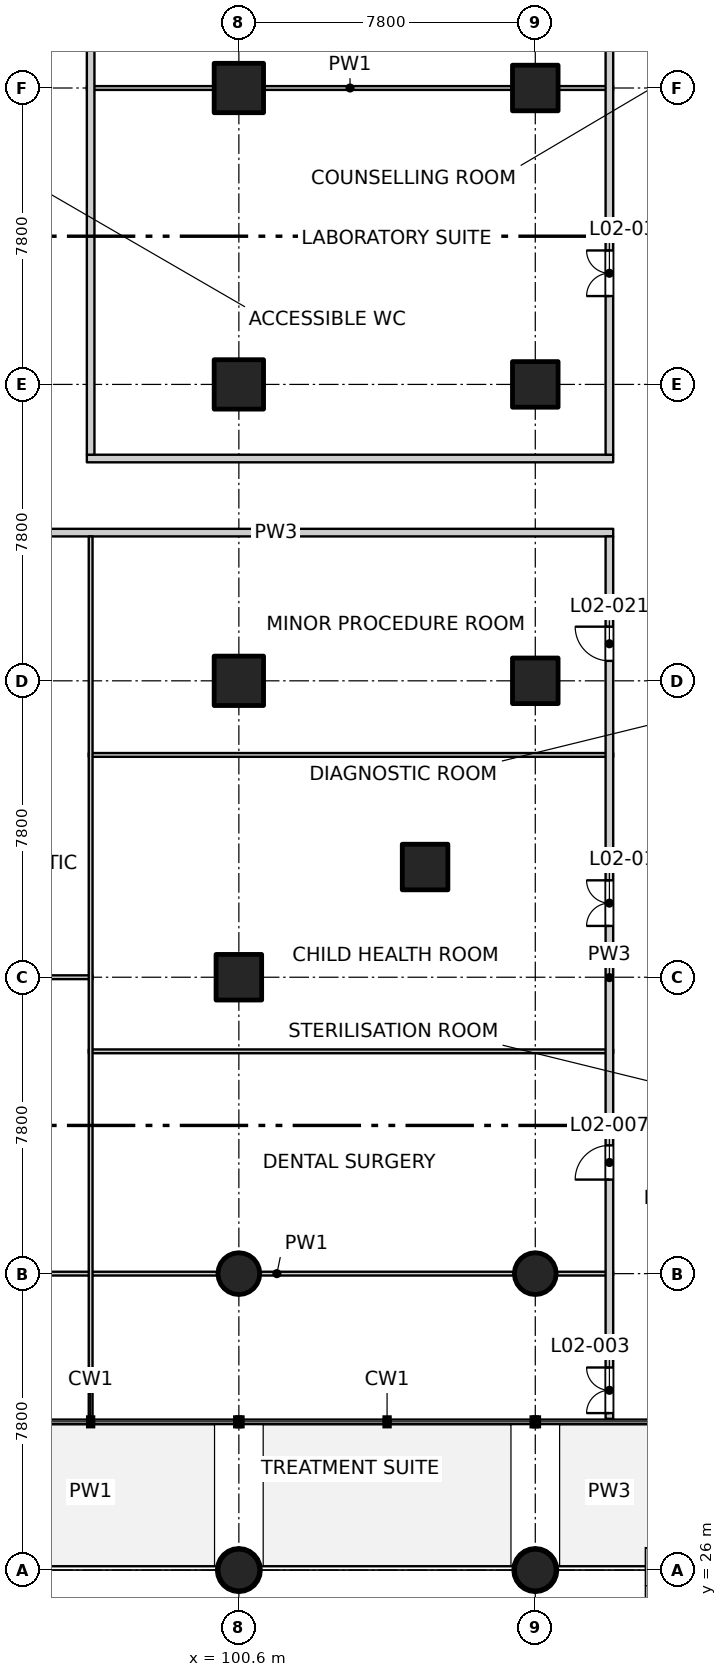
"""IFC4 building model, lengths in metres.
Left out: names, types, materials, properties, quantities, classifications, styles, units other than length and angle.
Written with IfcOpenShell. Run it as: python <this file> out.ifc"""

import sys

from ifc_helpers import new_model, si_unit, direction, frame, frame_2d, origin, origin_2d, place, context, subcontext, project, spatial, rectangle, circle, extrude, element, fill, save


model = new_model("IFC4")
c1 = context("Model", 3, precision=1e-05, world=origin(), true_north=direction((0.0, 1.0)))
c2 = subcontext(c1, "Body", "Model", "MODEL_VIEW")
j1 = project(units=[si_unit("LENGTHUNIT", "METRE"), si_unit("PLANEANGLEUNIT", "RADIAN")], contexts=[c1])
p1 = place(None, origin())
s1 = spatial("IfcSite", under=j1, at=p1, CompositionType="ELEMENT")
p2 = place(p1, origin())
s2 = spatial("IfcBuilding", under=s1, at=p2, CompositionType="ELEMENT")
p3 = place(p2, frame((0.0, 0.0, 10.5)))
s3 = spatial("IfcBuildingStorey", under=s2, at=p3, CompositionType="ELEMENT", Elevation=10.5)
for number, where, z_axis, x_axis in (
    (1, (105.5, 44.5, -0.3), (0.0, 0.0, 1.0), (1.0, 0.0, 0.0)),
    (2, (108.4, 49.4, -0.3), (0.0, 0.0, 1.0), (1.0, 0.0, 0.0)),
    (3, (108.4, 57.2, -0.3), (0.0, 0.0, 1.0), (1.0, 0.0, 0.0)),
    (4, (108.4, 65.0, -0.3), (0.0, 0.0, 1.0), (1.0, 0.0, 0.0)),
    (5, (100.6, 41.6, -0.3), (0.0, 0.0, 1.0), (1.0, 0.0, 0.0)),
):
    element("IfcColumn", number, at=place(p3, frame(where, z_axis=z_axis, x_axis=x_axis)), inside=s3, PredefinedType="COLUMN", context=c2, shape_type="SweptSolid", body=[
        extrude(rectangle(XDim=1.2, YDim=1.2, at=origin_2d()), origin(), (0.0, 0.0, 1.0), 4.45),
    ])
for number, where, z_axis, x_axis in (
    (6, (100.6, 49.4, -0.3), (0.0, 0.0, 1.0), (1.0, 0.0, 0.0)),
    (7, (100.6, 57.2, -0.3), (0.0, 0.0, 1.0), (1.0, 0.0, 0.0)),
    (8, (100.6, 65.0, -0.3), (0.0, 0.0, 1.0), (1.0, 0.0, 0.0)),
):
    element("IfcColumn", number, at=place(p3, frame(where, z_axis=z_axis, x_axis=x_axis)), inside=s3, PredefinedType="COLUMN", context=c2, shape_type="SweptSolid", body=[
        extrude(rectangle(XDim=1.3, YDim=1.3, at=origin_2d()), origin(), (0.0, 0.0, 1.0), 4.45),
    ])
for number, where, z_axis, x_axis in (
    (9, (100.6, 26.0, -0.3), (0.0, 0.0, 1.0), (1.0, 0.0, 0.0)),
    (10, (100.6, 33.8, -0.3), (0.0, 0.0, 1.0), (1.0, 0.0, 0.0)),
    (11, (108.4, 26.0, -0.3), (0.0, 0.0, 1.0), (1.0, 0.0, 0.0)),
    (12, (108.4, 33.8, -0.3), (0.0, 0.0, 1.0), (1.0, 0.0, 0.0)),
):
    element("IfcColumn", number, at=place(p3, frame(where, z_axis=z_axis, x_axis=x_axis)), inside=s3, PredefinedType="COLUMN", context=c2, shape_type="SweptSolid", body=[
        extrude(circle(Radius=0.55, at=origin_2d()), origin(), (0.0, 0.0, 1.0), 4.45),
    ])
p4 = place(p3, frame((92.75, 33.8, 0.0), z_axis=(0.0, 0.0, 1.0), x_axis=(1.0, 0.0, 0.0)))
e13 = element("IfcWall", 13, at=p4, inside=s3, PredefinedType="PARTITIONING", context=c2, shape_type="SweptSolid", body=[
    extrude(rectangle(XDim=17.7, YDim=0.1, at=frame_2d((8.85, 0.0))), origin(), (0.0, 0.0, 1.0), 4.15),
])
p5 = place(p3, frame((96.65, 39.65, 0.0), z_axis=(0.0, 0.0, 1.0), x_axis=(1.0, 0.0, 0.0)))
e14 = element("IfcWall", 14, at=p5, inside=s3, PredefinedType="PARTITIONING", context=c2, shape_type="SweptSolid", body=[
    extrude(rectangle(XDim=13.8, YDim=0.1, at=frame_2d((6.9, 0.0))), origin(), (0.0, 0.0, 1.0), 4.15),
])
p6 = place(p3, frame((92.75, 41.6, 0.0), z_axis=(0.0, 0.0, 1.0), x_axis=(1.0, 0.0, 0.0)))
e15 = element("IfcWall", 15, at=p6, inside=s3, PredefinedType="PARTITIONING", context=c2, shape_type="SweptSolid", body=[
    extrude(rectangle(XDim=4.0, YDim=0.1, at=frame_2d((2.0, 0.0))), origin(), (0.0, 0.0, 1.0), 3.7),
])
p7 = place(p3, frame((96.65, 47.45, 0.0), z_axis=(0.0, 0.0, 1.0), x_axis=(1.0, 0.0, 0.0)))
e16 = element("IfcWall", 16, at=p7, inside=s3, PredefinedType="PARTITIONING", context=c2, shape_type="SweptSolid", body=[
    extrude(rectangle(XDim=13.8, YDim=0.1, at=frame_2d((6.9, 0.0))), origin(), (0.0, 0.0, 1.0), 4.15),
])
p8 = place(p3, frame((92.7, 53.3, 0.0), z_axis=(0.0, 0.0, 1.0), x_axis=(1.0, 0.0, 0.0)))
e17 = element("IfcWall", 17, at=p8, inside=s3, PredefinedType="PARTITIONING", context=c2, shape_type="SweptSolid", body=[
    extrude(rectangle(XDim=17.75, YDim=0.2, at=frame_2d((8.875, 0.0))), origin(), (0.0, 0.0, 1.0), 4.15),
])
p9 = place(p3, frame((96.6, 55.25, 0.0), z_axis=(0.0, 0.0, 1.0), x_axis=(1.0, 0.0, 0.0)))
e18 = element("IfcWall", 18, at=p9, inside=s3, PredefinedType="PARTITIONING", context=c2, shape_type="SweptSolid", body=[
    extrude(rectangle(XDim=13.85, YDim=0.2, at=frame_2d((6.925, 0.0))), origin(), (0.0, 0.0, 1.0), 4.15),
])
p10 = place(p3, frame((96.6, 65.0, 0.0), z_axis=(0.0, 0.0, 1.0), x_axis=(1.0, 0.0, 0.0)))
e19 = element("IfcWall", 19, at=p10, inside=s3, PredefinedType="PARTITIONING", context=c2, shape_type="SweptSolid", body=[
    extrude(rectangle(XDim=13.85, YDim=0.1, at=frame_2d((6.925, 0.0))), origin(), (0.0, 0.0, 1.0), 4.15),
])
p11 = place(p3, frame((96.7, 26.3, 0.0), z_axis=(0.0, 0.0, 1.0), x_axis=(0.0, 1.0, 0.0)))
e20 = element("IfcWall", 20, at=p11, inside=s3, PredefinedType="PARTITIONING", context=c2, shape_type="SweptSolid", body=[
    extrude(rectangle(XDim=3.52, YDim=0.1, at=frame_2d((1.76, 0.0))), origin(), (0.0, 0.0, 1.0), 4.15),
])
p12 = place(p3, frame((96.7, 29.98, 0.0), z_axis=(0.0, 0.0, 1.0), x_axis=(0.0, 1.0, 0.0)))
e21 = element("IfcWall", 21, at=p12, inside=s3, PredefinedType="PARTITIONING", context=c2, shape_type="SweptSolid", body=[
    extrude(rectangle(XDim=23.22, YDim=0.1, at=frame_2d((11.61, 0.0))), origin(), (0.0, 0.0, 1.0), 4.15),
])
p13 = place(p3, frame((96.7, 55.35, 0.0), z_axis=(0.0, 0.0, 1.0), x_axis=(0.0, 1.0, 0.0)))
e22 = element("IfcWall", 22, at=p13, inside=s3, PredefinedType="PARTITIONING", context=c2, shape_type="SweptSolid", body=[
    extrude(rectangle(XDim=32.75, YDim=0.2, at=frame_2d((16.375, 0.0))), origin(), (0.0, 0.0, 1.0), 4.15),
])
p14 = place(p3, frame((110.35, 26.3, 0.0), z_axis=(0.0, 0.0, 1.0), x_axis=(0.0, 1.0, 0.0)))
e23 = element("IfcWall", 23, at=p14, inside=s3, PredefinedType="PARTITIONING", context=c2, shape_type="SweptSolid", body=[
    extrude(rectangle(XDim=3.52, YDim=0.2, at=frame_2d((1.76, 0.0))), origin(), (0.0, 0.0, 1.0), 4.15),
])
p15 = place(p3, frame((110.35, 29.98, 0.0), z_axis=(0.0, 0.0, 1.0), x_axis=(0.0, 1.0, 0.0)))
e24 = element("IfcWall", 24, at=p15, inside=s3, PredefinedType="PARTITIONING", context=c2, shape_type="SweptSolid", body=[
    extrude(rectangle(XDim=23.22, YDim=0.2, at=frame_2d((11.61, 0.0))), origin(), (0.0, 0.0, 1.0), 4.15),
])
p16 = place(p15, frame((0.15, 0.0, 0.0)))
e25 = element("IfcOpeningElement", 25, at=p16, cuts=e24, PredefinedType="OPENING", context=c2, shape_type="SweptSolid", body=[
    extrude(rectangle(XDim=1.2, YDim=2.1, at=frame_2d((0.6, 1.05))), frame((0.0, 0.11, 0.0), z_axis=(0.0, -1.0, 0.0), x_axis=(1.0, 0.0, 0.0)), (0.0, 0.0, 1.0), 0.22),
])
p17 = place(p15, frame((6.295, 0.0, 0.0)))
e26 = element("IfcOpeningElement", 26, at=p17, cuts=e24, PredefinedType="OPENING", context=c2, shape_type="SweptSolid", body=[
    extrude(rectangle(XDim=0.9, YDim=2.1, at=frame_2d((0.45, 1.05))), frame((0.0, 0.11, 0.0), z_axis=(0.0, -1.0, 0.0), x_axis=(1.0, 0.0, 0.0)), (0.0, 0.0, 1.0), 0.22),
])
p18 = place(p15, frame((12.97, 0.0, 0.0)))
e27 = element("IfcOpeningElement", 27, at=p18, cuts=e24, PredefinedType="OPENING", context=c2, shape_type="SweptSolid", body=[
    extrude(rectangle(XDim=1.2, YDim=2.1, at=frame_2d((0.6, 1.05))), frame((0.0, 0.11, 0.0), z_axis=(0.0, -1.0, 0.0), x_axis=(1.0, 0.0, 0.0)), (0.0, 0.0, 1.0), 0.22),
])
p19 = place(p15, frame((19.945, 0.0, 0.0)))
e28 = element("IfcOpeningElement", 28, at=p19, cuts=e24, PredefinedType="OPENING", context=c2, shape_type="SweptSolid", body=[
    extrude(rectangle(XDim=0.9, YDim=2.1, at=frame_2d((0.45, 1.05))), frame((0.0, 0.11, 0.0), z_axis=(0.0, -1.0, 0.0), x_axis=(1.0, 0.0, 0.0)), (0.0, 0.0, 1.0), 0.22),
])
p20 = place(p3, frame((110.35, 55.35, 0.0), z_axis=(0.0, 0.0, 1.0), x_axis=(0.0, 1.0, 0.0)))
e29 = element("IfcWall", 29, at=p20, inside=s3, PredefinedType="PARTITIONING", context=c2, shape_type="SweptSolid", body=[
    extrude(rectangle(XDim=32.75, YDim=0.2, at=frame_2d((16.375, 0.0))), origin(), (0.0, 0.0, 1.0), 4.15),
])
p21 = place(p20, frame((4.175, 0.0, 0.0)))
e30 = element("IfcOpeningElement", 30, at=p21, cuts=e29, PredefinedType="OPENING", context=c2, shape_type="SweptSolid", body=[
    extrude(rectangle(XDim=1.2, YDim=2.1, at=frame_2d((0.6, 1.05))), frame((0.0, 0.11, 0.0), z_axis=(0.0, -1.0, 0.0), x_axis=(1.0, 0.0, 0.0)), (0.0, 0.0, 1.0), 0.22),
])
p22 = place(p20, frame((12.95, 0.0, 0.0)))
e31 = element("IfcOpeningElement", 31, at=p22, cuts=e29, PredefinedType="OPENING", context=c2, shape_type="SweptSolid", body=[
    extrude(rectangle(XDim=1.2, YDim=2.1, at=frame_2d((0.6, 1.05))), frame((0.0, 0.11, 0.0), z_axis=(0.0, -1.0, 0.0), x_axis=(1.0, 0.0, 0.0)), (0.0, 0.0, 1.0), 0.22),
])
p23 = place(p20, frame((20.75, 0.0, 0.0)))
e32 = element("IfcOpeningElement", 32, at=p23, cuts=e29, PredefinedType="OPENING", context=c2, shape_type="SweptSolid", body=[
    extrude(rectangle(XDim=1.2, YDim=2.1, at=frame_2d((0.6, 1.05))), frame((0.0, 0.11, 0.0), z_axis=(0.0, -1.0, 0.0), x_axis=(1.0, 0.0, 0.0)), (0.0, 0.0, 1.0), 0.22),
])
p24 = place(p20, frame((28.55, 0.0, 0.0)))
e33 = element("IfcOpeningElement", 33, at=p24, cuts=e29, PredefinedType="OPENING", context=c2, shape_type="SweptSolid", body=[
    extrude(rectangle(XDim=1.2, YDim=2.1, at=frame_2d((0.6, 1.05))), frame((0.0, 0.11, 0.0), z_axis=(0.0, -1.0, 0.0), x_axis=(1.0, 0.0, 0.0)), (0.0, 0.0, 1.0), 0.22),
])
p25 = place(p16, origin())
e34 = element("IfcDoor", 34, at=p25, inside=s3, OperationType="DOUBLE_DOOR_SINGLE_SWING", PredefinedType="DOOR", context=c2, shape_type="SweptSolid", body=[
    extrude(rectangle(XDim=1.2, YDim=2.1, at=frame_2d((0.6, 1.05))), frame((0.0, 0.025, 0.0), z_axis=(0.0, -1.0, 0.0), x_axis=(1.0, 0.0, 0.0)), (0.0, 0.0, 1.0), 0.05),
])
fill(e25, e34)
p26 = place(p17, origin())
e35 = element("IfcDoor", 35, at=p26, inside=s3, OperationType="SINGLE_SWING_LEFT", PredefinedType="DOOR", context=c2, shape_type="SweptSolid", body=[
    extrude(rectangle(XDim=0.9, YDim=2.1, at=frame_2d((0.45, 1.05))), frame((0.0, 0.025, 0.0), z_axis=(0.0, -1.0, 0.0), x_axis=(1.0, 0.0, 0.0)), (0.0, 0.0, 1.0), 0.05),
])
fill(e26, e35)
p27 = place(p18, origin())
e36 = element("IfcDoor", 36, at=p27, inside=s3, OperationType="DOUBLE_DOOR_SINGLE_SWING", PredefinedType="DOOR", context=c2, shape_type="SweptSolid", body=[
    extrude(rectangle(XDim=1.2, YDim=2.1, at=frame_2d((0.6, 1.05))), frame((0.0, 0.025, 0.0), z_axis=(0.0, -1.0, 0.0), x_axis=(1.0, 0.0, 0.0)), (0.0, 0.0, 1.0), 0.05),
])
fill(e27, e36)
p28 = place(p19, origin())
e37 = element("IfcDoor", 37, at=p28, inside=s3, OperationType="SINGLE_SWING_RIGHT", PredefinedType="DOOR", context=c2, shape_type="SweptSolid", body=[
    extrude(rectangle(XDim=0.9, YDim=2.1, at=frame_2d((0.45, 1.05))), frame((0.0, 0.025, 0.0), z_axis=(0.0, -1.0, 0.0), x_axis=(1.0, 0.0, 0.0)), (0.0, 0.0, 1.0), 0.05),
])
fill(e28, e37)
p29 = place(p21, origin())
e38 = element("IfcDoor", 38, at=p29, inside=s3, OperationType="DOUBLE_DOOR_SINGLE_SWING", PredefinedType="DOOR", context=c2, shape_type="SweptSolid", body=[
    extrude(rectangle(XDim=1.2, YDim=2.1, at=frame_2d((0.6, 1.05))), frame((0.0, 0.025, 0.0), z_axis=(0.0, -1.0, 0.0), x_axis=(1.0, 0.0, 0.0)), (0.0, 0.0, 1.0), 0.05),
])
fill(e30, e38)
save(model, sys.argv[1])
